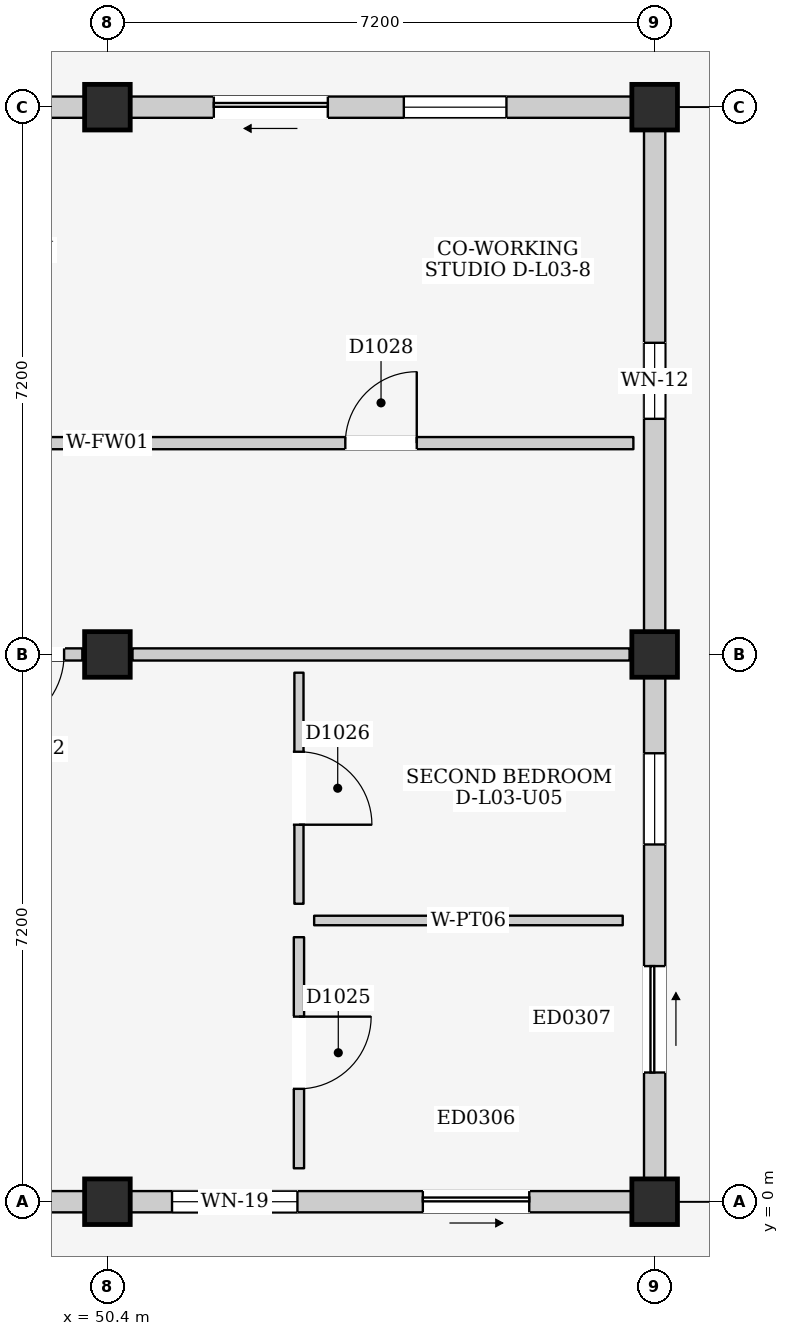
"""IFC4 building model, lengths in metres.
Left out: names, types, materials, properties, quantities, classifications, styles, units other than length and angle.
Written with IfcOpenShell. Run it as: python <this file> out.ifc"""

import sys

from ifc_helpers import new_model, si_unit, direction, frame, frame_2d, origin, origin_2d, place, context, subcontext, project, spatial, rectangle, extrude, element, fill, save


model = new_model("IFC4")
c1 = context("Model", 3, precision=1e-05, world=origin(), true_north=direction((0.0, 1.0)))
c2 = subcontext(c1, "Body", "Model", "MODEL_VIEW")
j1 = project(units=[si_unit("LENGTHUNIT", "METRE"), si_unit("PLANEANGLEUNIT", "RADIAN")], contexts=[c1])
p1 = place(None, origin())
s1 = spatial("IfcSite", under=j1, at=p1, CompositionType="ELEMENT")
p2 = place(p1, origin())
s2 = spatial("IfcBuilding", under=s1, at=p2, CompositionType="ELEMENT")
p3 = place(p2, frame((0.0, 0.0, 12.2)))
s3 = spatial("IfcBuildingStorey", under=s2, at=p3, CompositionType="ELEMENT", Elevation=12.2)
for number, where, z_axis, x_axis in (
    (1, (50.4, 0.0, 0.0), (0.0, 0.0, 1.0), (1.0, 0.0, 0.0)),
    (2, (50.4, 7.2, 0.0), (0.0, 0.0, 1.0), (1.0, 0.0, 0.0)),
    (3, (50.4, 14.4, 0.0), (0.0, 0.0, 1.0), (1.0, 0.0, 0.0)),
    (4, (57.6, 0.0, 0.0), (0.0, 0.0, 1.0), (1.0, 0.0, 0.0)),
    (5, (57.6, 7.2, 0.0), (0.0, 0.0, 1.0), (1.0, 0.0, 0.0)),
    (6, (57.6, 14.4, 0.0), (0.0, 0.0, 1.0), (1.0, 0.0, 0.0)),
):
    element("IfcColumn", number, at=place(p3, frame(where, z_axis=z_axis, x_axis=x_axis)), inside=s3, PredefinedType="COLUMN", context=c2, shape_type="SweptSolid", body=[
        extrude(rectangle(XDim=0.6, YDim=0.6, at=origin_2d()), origin(), (0.0, 0.0, 1.0), 3.2),
    ])
p4 = place(p3, frame((43.5, 0.0, 0.0), z_axis=(0.0, 0.0, 1.0), x_axis=(1.0, 0.0, 0.0)))
e7 = element("IfcWall", 7, at=p4, inside=s3, PredefinedType="ELEMENTEDWALL", context=c2, shape_type="SweptSolid", body=[
    extrude(rectangle(XDim=6.6, YDim=0.28, at=frame_2d((3.3, 0.0))), origin(), (0.0, 0.0, 1.0), 2.445),
])
p5 = place(p4, frame((3.85, 0.0, 0.0)))
e8 = element("IfcOpeningElement", 8, at=p5, cuts=e7, PredefinedType="OPENING", context=c2, shape_type="SweptSolid", body=[
    extrude(rectangle(XDim=2.0, YDim=2.12, at=frame_2d((1.0, 1.06))), frame((0.0, 0.155, 0.0), z_axis=(0.0, -1.0, 0.0), x_axis=(1.0, 0.0, 0.0)), (0.0, 0.0, 1.0), 0.31),
])
p6 = place(p4, frame((0.55, 0.0, 0.785)))
e9 = element("IfcOpeningElement", 9, at=p6, cuts=e7, PredefinedType="OPENING", context=c2, shape_type="SweptSolid", body=[
    extrude(rectangle(XDim=1.95, YDim=1.55, at=frame_2d((0.975, 0.775))), frame((0.0, 0.155, 0.0), z_axis=(0.0, -1.0, 0.0), x_axis=(1.0, 0.0, 0.0)), (0.0, 0.0, 1.0), 0.31),
])
p7 = place(p3, frame((43.5, 14.4, 0.0), z_axis=(0.0, 0.0, 1.0), x_axis=(1.0, 0.0, 0.0)))
e10 = element("IfcWall", 10, at=p7, inside=s3, PredefinedType="ELEMENTEDWALL", context=c2, shape_type="SweptSolid", body=[
    extrude(rectangle(XDim=6.6, YDim=0.28, at=frame_2d((3.3, 0.0))), origin(), (0.0, 0.0, 1.0), 2.365),
])
p8 = place(p7, frame((1.1, 0.0, 0.0)))
e11 = element("IfcOpeningElement", 11, at=p8, cuts=e10, PredefinedType="OPENING", context=c2, shape_type="SweptSolid", body=[
    extrude(rectangle(XDim=1.5, YDim=2.12, at=frame_2d((0.75, 1.06))), frame((0.0, 0.155, 0.0), z_axis=(0.0, -1.0, 0.0), x_axis=(1.0, 0.0, 0.0)), (0.0, 0.0, 1.0), 0.31),
])
p9 = place(p7, frame((3.6, 0.0, 0.755)))
e12 = element("IfcOpeningElement", 12, at=p9, cuts=e10, PredefinedType="OPENING", context=c2, shape_type="SweptSolid", body=[
    extrude(rectangle(XDim=1.35, YDim=1.5, at=frame_2d((0.675, 0.75))), frame((0.0, 0.155, 0.0), z_axis=(0.0, -1.0, 0.0), x_axis=(1.0, 0.0, 0.0)), (0.0, 0.0, 1.0), 0.31),
])
p10 = place(p3, frame((50.7, 0.0, 0.0), z_axis=(0.0, 0.0, 1.0), x_axis=(1.0, 0.0, 0.0)))
e13 = element("IfcWall", 13, at=p10, inside=s3, PredefinedType="ELEMENTEDWALL", context=c2, shape_type="SweptSolid", body=[
    extrude(rectangle(XDim=6.6, YDim=0.28, at=frame_2d((3.3, 0.0))), origin(), (0.0, 0.0, 1.0), 2.445),
])
p11 = place(p10, frame((3.85, 0.0, 0.0)))
e14 = element("IfcOpeningElement", 14, at=p11, cuts=e13, PredefinedType="OPENING", context=c2, shape_type="SweptSolid", body=[
    extrude(rectangle(XDim=1.4, YDim=2.1, at=frame_2d((0.7, 1.05))), frame((0.0, 0.155, 0.0), z_axis=(0.0, -1.0, 0.0), x_axis=(1.0, 0.0, 0.0)), (0.0, 0.0, 1.0), 0.31),
])
p12 = place(p10, frame((0.55, 0.0, 0.9)))
e15 = element("IfcOpeningElement", 15, at=p12, cuts=e13, PredefinedType="OPENING", context=c2, shape_type="SweptSolid", body=[
    extrude(rectangle(XDim=1.65, YDim=1.35, at=frame_2d((0.825, 0.675))), frame((0.0, 0.155, 0.0), z_axis=(0.0, -1.0, 0.0), x_axis=(1.0, 0.0, 0.0)), (0.0, 0.0, 1.0), 0.31),
])
p13 = place(p3, frame((57.6, 0.3, 0.0), z_axis=(0.0, 0.0, 1.0), x_axis=(0.0, 1.0, 0.0)))
e16 = element("IfcWall", 16, at=p13, inside=s3, PredefinedType="ELEMENTEDWALL", context=c2, shape_type="SweptSolid", body=[
    extrude(rectangle(XDim=6.6, YDim=0.28, at=frame_2d((3.3, 0.0))), origin(), (0.0, 0.0, 1.0), 2.415),
])
p14 = place(p13, frame((1.4, 0.0, 0.0)))
e17 = element("IfcOpeningElement", 17, at=p14, cuts=e16, PredefinedType="OPENING", context=c2, shape_type="SweptSolid", body=[
    extrude(rectangle(XDim=1.4, YDim=2.1, at=frame_2d((0.7, 1.05))), frame((0.0, 0.155, 0.0), z_axis=(0.0, -1.0, 0.0), x_axis=(1.0, 0.0, 0.0)), (0.0, 0.0, 1.0), 0.31),
])
p15 = place(p13, frame((4.4, 0.0, 0.95)))
e18 = element("IfcOpeningElement", 18, at=p15, cuts=e16, PredefinedType="OPENING", context=c2, shape_type="SweptSolid", body=[
    extrude(rectangle(XDim=1.2, YDim=1.35, at=frame_2d((0.6, 0.675))), frame((0.0, 0.155, 0.0), z_axis=(0.0, -1.0, 0.0), x_axis=(1.0, 0.0, 0.0)), (0.0, 0.0, 1.0), 0.31),
])
p16 = place(p3, frame((50.7, 14.4, 0.0), z_axis=(0.0, 0.0, 1.0), x_axis=(1.0, 0.0, 0.0)))
e19 = element("IfcWall", 19, at=p16, inside=s3, PredefinedType="ELEMENTEDWALL", context=c2, shape_type="SweptSolid", body=[
    extrude(rectangle(XDim=6.6, YDim=0.28, at=frame_2d((3.3, 0.0))), origin(), (0.0, 0.0, 1.0), 2.365),
])
p17 = place(p16, frame((1.1, 0.0, 0.0)))
e20 = element("IfcOpeningElement", 20, at=p17, cuts=e19, PredefinedType="OPENING", context=c2, shape_type="SweptSolid", body=[
    extrude(rectangle(XDim=1.5, YDim=2.12, at=frame_2d((0.75, 1.06))), frame((0.0, 0.155, 0.0), z_axis=(0.0, -1.0, 0.0), x_axis=(1.0, 0.0, 0.0)), (0.0, 0.0, 1.0), 0.31),
])
p18 = place(p16, frame((3.6, 0.0, 0.755)))
e21 = element("IfcOpeningElement", 21, at=p18, cuts=e19, PredefinedType="OPENING", context=c2, shape_type="SweptSolid", body=[
    extrude(rectangle(XDim=1.35, YDim=1.5, at=frame_2d((0.675, 0.75))), frame((0.0, 0.155, 0.0), z_axis=(0.0, -1.0, 0.0), x_axis=(1.0, 0.0, 0.0)), (0.0, 0.0, 1.0), 0.31),
])
p19 = place(p3, frame((57.6, 7.5, 0.0), z_axis=(0.0, 0.0, 1.0), x_axis=(0.0, 1.0, 0.0)))
e22 = element("IfcWall", 22, at=p19, inside=s3, PredefinedType="ELEMENTEDWALL", context=c2, shape_type="SweptSolid", body=[
    extrude(rectangle(XDim=6.6, YDim=0.28, at=frame_2d((3.3, 0.0))), origin(), (0.0, 0.0, 1.0), 2.415),
])
p20 = place(p19, frame((2.8, 0.0, 1.1)))
e23 = element("IfcOpeningElement", 23, at=p20, cuts=e22, PredefinedType="OPENING", context=c2, shape_type="SweptSolid", body=[
    extrude(rectangle(XDim=1.0, YDim=0.9, at=frame_2d((0.5, 0.45))), frame((0.0, 0.155, 0.0), z_axis=(0.0, -1.0, 0.0), x_axis=(1.0, 0.0, 0.0)), (0.0, 0.0, 1.0), 0.31),
])
p21 = place(p3, frame((43.53, 7.2, 0.0), z_axis=(0.0, 0.0, 1.0), x_axis=(1.0, 0.0, 0.0)))
e24 = element("IfcWall", 24, at=p21, inside=s3, PredefinedType="PARTITIONING", context=c2, shape_type="SweptSolid", body=[
    extrude(rectangle(XDim=6.54, YDim=0.16, at=frame_2d((3.27, 0.0))), origin(), (0.0, 0.0, 1.0), 2.365),
])
p22 = place(p21, frame((5.3, 0.0, 0.0)))
e25 = element("IfcOpeningElement", 25, at=p22, cuts=e24, PredefinedType="OPENING", context=c2, shape_type="SweptSolid", body=[
    extrude(rectangle(XDim=1.0, YDim=2.15, at=frame_2d((0.5, 1.075))), frame((0.0, 0.095, 0.0), z_axis=(0.0, -1.0, 0.0), x_axis=(1.0, 0.0, 0.0)), (0.0, 0.0, 1.0), 0.19),
])
p23 = place(p3, frame((50.73, 7.2, 0.0), z_axis=(0.0, 0.0, 1.0), x_axis=(1.0, 0.0, 0.0)))
e26 = element("IfcWall", 26, at=p23, inside=s3, PredefinedType="PARTITIONING", context=c2, shape_type="SweptSolid", body=[
    extrude(rectangle(XDim=6.54, YDim=0.16, at=frame_2d((3.27, 0.0))), origin(), (0.0, 0.0, 1.0), 2.365),
])
p24 = place(p3, frame((52.92, 0.44, 0.0), z_axis=(0.0, 0.0, 1.0), x_axis=(0.0, 1.0, 0.0)))
e27 = element("IfcWall", 27, at=p24, inside=s3, PredefinedType="PARTITIONING", context=c2, shape_type="SweptSolid", body=[
    extrude(rectangle(XDim=3.04, YDim=0.135, at=frame_2d((1.52, 0.0))), origin(), (0.0, 0.0, 1.0), 2.98),
])
p25 = place(p24, frame((1.045, 0.0, 0.0)))
e28 = element("IfcOpeningElement", 28, at=p25, cuts=e27, PredefinedType="OPENING", context=c2, shape_type="SweptSolid", body=[
    extrude(rectangle(XDim=0.95, YDim=2.15, at=frame_2d((0.475, 1.075))), frame((0.0, 0.083, 0.0), z_axis=(0.0, -1.0, 0.0), x_axis=(1.0, 0.0, 0.0)), (0.0, 0.0, 1.0), 0.165),
])
p26 = place(p3, frame((53.12, 3.7, 0.0), z_axis=(0.0, 0.0, 1.0), x_axis=(1.0, 0.0, 0.0)))
e29 = element("IfcWall", 29, at=p26, inside=s3, PredefinedType="PARTITIONING", context=c2, shape_type="SweptSolid", body=[
    extrude(rectangle(XDim=4.06, YDim=0.125, at=frame_2d((2.03, 0.0))), origin(), (0.0, 0.0, 1.0), 2.98),
])
p27 = place(p3, frame((52.92, 3.92, 0.0), z_axis=(0.0, 0.0, 1.0), x_axis=(0.0, 1.0, 0.0)))
e30 = element("IfcWall", 30, at=p27, inside=s3, PredefinedType="PARTITIONING", context=c2, shape_type="SweptSolid", body=[
    extrude(rectangle(XDim=3.04, YDim=0.12, at=frame_2d((1.52, 0.0))), origin(), (0.0, 0.0, 1.0), 2.98),
])
p28 = place(p27, frame((1.04, 0.0, 0.0)))
e31 = element("IfcOpeningElement", 31, at=p28, cuts=e30, PredefinedType="OPENING", context=c2, shape_type="SweptSolid", body=[
    extrude(rectangle(XDim=0.96, YDim=2.15, at=frame_2d((0.48, 1.075))), frame((0.0, 0.075, 0.0), z_axis=(0.0, -1.0, 0.0), x_axis=(1.0, 0.0, 0.0)), (0.0, 0.0, 1.0), 0.15),
])
p29 = place(p3, frame((43.48, 9.98, 0.0), z_axis=(0.0, 0.0, 1.0), x_axis=(1.0, 0.0, 0.0)))
e32 = element("IfcWall", 32, at=p29, inside=s3, PredefinedType="PARTITIONING", context=c2, shape_type="SweptSolid", body=[
    extrude(rectangle(XDim=6.64, YDim=0.16, at=frame_2d((3.32, 0.0))), origin(), (0.0, 0.0, 1.0), 2.98),
])
p30 = place(p29, frame((2.85, 0.0, 0.0)))
e33 = element("IfcOpeningElement", 33, at=p30, cuts=e32, PredefinedType="OPENING", context=c2, shape_type="SweptSolid", body=[
    extrude(rectangle(XDim=0.94, YDim=2.12, at=frame_2d((0.47, 1.06))), frame((0.0, 0.095, 0.0), z_axis=(0.0, -1.0, 0.0), x_axis=(1.0, 0.0, 0.0)), (0.0, 0.0, 1.0), 0.19),
])
p31 = place(p3, frame((50.68, 9.98, 0.0), z_axis=(0.0, 0.0, 1.0), x_axis=(1.0, 0.0, 0.0)))
e34 = element("IfcWall", 34, at=p31, inside=s3, PredefinedType="PARTITIONING", context=c2, shape_type="SweptSolid", body=[
    extrude(rectangle(XDim=6.64, YDim=0.16, at=frame_2d((3.32, 0.0))), origin(), (0.0, 0.0, 1.0), 2.98),
])
p32 = place(p31, frame((2.85, 0.0, 0.0)))
e35 = element("IfcOpeningElement", 35, at=p32, cuts=e34, PredefinedType="OPENING", context=c2, shape_type="SweptSolid", body=[
    extrude(rectangle(XDim=0.94, YDim=2.12, at=frame_2d((0.47, 1.06))), frame((0.0, 0.095, 0.0), z_axis=(0.0, -1.0, 0.0), x_axis=(1.0, 0.0, 0.0)), (0.0, 0.0, 1.0), 0.19),
])
p33 = place(p11, frame((1.4, 0.0, 0.0), z_axis=(0.0, 0.0, 1.0), x_axis=(-1.0, 0.0, 0.0)))
e36 = element("IfcDoor", 36, at=p33, inside=s3, OperationType="SLIDING_TO_RIGHT", PredefinedType="DOOR", context=c2, shape_type="SweptSolid", body=[
    extrude(rectangle(XDim=1.4, YDim=2.1, at=frame_2d((0.7, 1.05))), frame((0.0, 0.025, 0.0), z_axis=(0.0, -1.0, 0.0), x_axis=(1.0, 0.0, 0.0)), (0.0, 0.0, 1.0), 0.05),
])
fill(e14, e36)
p34 = place(p12, origin())
e37 = element("IfcWindow", 37, at=p34, inside=s3, PartitioningType="DOUBLE_PANEL_VERTICAL", PredefinedType="WINDOW", context=c2, shape_type="SweptSolid", body=[
    extrude(rectangle(XDim=1.65, YDim=1.35, at=frame_2d((0.825, 0.675))), frame((0.0, 0.03, 0.0), z_axis=(0.0, -1.0, 0.0), x_axis=(1.0, 0.0, 0.0)), (0.0, 0.0, 1.0), 0.06),
])
fill(e15, e37)
p35 = place(p14, frame((1.4, 0.0, 0.0), z_axis=(0.0, 0.0, 1.0), x_axis=(-1.0, 0.0, 0.0)))
e38 = element("IfcDoor", 38, at=p35, inside=s3, OperationType="SLIDING_TO_RIGHT", PredefinedType="DOOR", context=c2, shape_type="SweptSolid", body=[
    extrude(rectangle(XDim=1.4, YDim=2.1, at=frame_2d((0.7, 1.05))), frame((0.0, 0.025, 0.0), z_axis=(0.0, -1.0, 0.0), x_axis=(1.0, 0.0, 0.0)), (0.0, 0.0, 1.0), 0.05),
])
fill(e17, e38)
p36 = place(p15, origin())
e39 = element("IfcWindow", 39, at=p36, inside=s3, PartitioningType="SINGLE_PANEL", PredefinedType="WINDOW", context=c2, shape_type="SweptSolid", body=[
    extrude(rectangle(XDim=1.2, YDim=1.35, at=frame_2d((0.6, 0.675))), frame((0.0, 0.03, 0.0), z_axis=(0.0, -1.0, 0.0), x_axis=(1.0, 0.0, 0.0)), (0.0, 0.0, 1.0), 0.06),
])
fill(e18, e39)
p37 = place(p17, frame((1.5, 0.0, 0.0), z_axis=(0.0, 0.0, 1.0), x_axis=(-1.0, 0.0, 0.0)))
e40 = element("IfcDoor", 40, at=p37, inside=s3, OperationType="SLIDING_TO_LEFT", PredefinedType="DOOR", context=c2, shape_type="SweptSolid", body=[
    extrude(rectangle(XDim=1.5, YDim=2.12, at=frame_2d((0.75, 1.06))), frame((0.0, 0.025, 0.0), z_axis=(0.0, -1.0, 0.0), x_axis=(1.0, 0.0, 0.0)), (0.0, 0.0, 1.0), 0.05),
])
fill(e20, e40)
p38 = place(p18, origin())
e41 = element("IfcWindow", 41, at=p38, inside=s3, PartitioningType="SINGLE_PANEL", PredefinedType="WINDOW", context=c2, shape_type="SweptSolid", body=[
    extrude(rectangle(XDim=1.35, YDim=1.5, at=frame_2d((0.675, 0.75))), frame((0.0, 0.03, 0.0), z_axis=(0.0, -1.0, 0.0), x_axis=(1.0, 0.0, 0.0)), (0.0, 0.0, 1.0), 0.06),
])
fill(e21, e41)
p39 = place(p20, origin())
e42 = element("IfcWindow", 42, at=p39, inside=s3, PartitioningType="SINGLE_PANEL", PredefinedType="WINDOW", context=c2, shape_type="SweptSolid", body=[
    extrude(rectangle(XDim=1.0, YDim=0.9, at=frame_2d((0.5, 0.45))), frame((0.0, 0.03, 0.0), z_axis=(0.0, -1.0, 0.0), x_axis=(1.0, 0.0, 0.0)), (0.0, 0.0, 1.0), 0.06),
])
fill(e23, e42)
p40 = place(p22, frame((1.0, 0.0, 0.0), z_axis=(0.0, 0.0, 1.0), x_axis=(-1.0, 0.0, 0.0)))
e43 = element("IfcDoor", 43, at=p40, inside=s3, OperationType="SINGLE_SWING_RIGHT", PredefinedType="DOOR", context=c2, shape_type="SweptSolid", body=[
    extrude(rectangle(XDim=1.0, YDim=2.15, at=frame_2d((0.5, 1.075))), frame((0.0, 0.025, 0.0), z_axis=(0.0, -1.0, 0.0), x_axis=(1.0, 0.0, 0.0)), (0.0, 0.0, 1.0), 0.05),
])
fill(e25, e43)
p41 = place(p25, frame((0.95, 0.0, 0.0), z_axis=(0.0, 0.0, 1.0), x_axis=(-1.0, 0.0, 0.0)))
e44 = element("IfcDoor", 44, at=p41, inside=s3, OperationType="SINGLE_SWING_LEFT", PredefinedType="DOOR", context=c2, shape_type="SweptSolid", body=[
    extrude(rectangle(XDim=0.95, YDim=2.15, at=frame_2d((0.475, 1.075))), frame((0.0, 0.025, 0.0), z_axis=(0.0, -1.0, 0.0), x_axis=(1.0, 0.0, 0.0)), (0.0, 0.0, 1.0), 0.05),
])
fill(e28, e44)
p42 = place(p28, frame((0.96, 0.0, 0.0), z_axis=(0.0, 0.0, 1.0), x_axis=(-1.0, 0.0, 0.0)))
e45 = element("IfcDoor", 45, at=p42, inside=s3, OperationType="SINGLE_SWING_RIGHT", PredefinedType="DOOR", context=c2, shape_type="SweptSolid", body=[
    extrude(rectangle(XDim=0.96, YDim=2.15, at=frame_2d((0.48, 1.075))), frame((0.0, 0.025, 0.0), z_axis=(0.0, -1.0, 0.0), x_axis=(1.0, 0.0, 0.0)), (0.0, 0.0, 1.0), 0.05),
])
fill(e31, e45)
p43 = place(p32, origin())
e46 = element("IfcDoor", 46, at=p43, inside=s3, OperationType="SINGLE_SWING_RIGHT", PredefinedType="DOOR", context=c2, shape_type="SweptSolid", body=[
    extrude(rectangle(XDim=0.94, YDim=2.12, at=frame_2d((0.47, 1.06))), frame((0.0, 0.025, 0.0), z_axis=(0.0, -1.0, 0.0), x_axis=(1.0, 0.0, 0.0)), (0.0, 0.0, 1.0), 0.05),
])
fill(e35, e46)
save(model, sys.argv[1])
